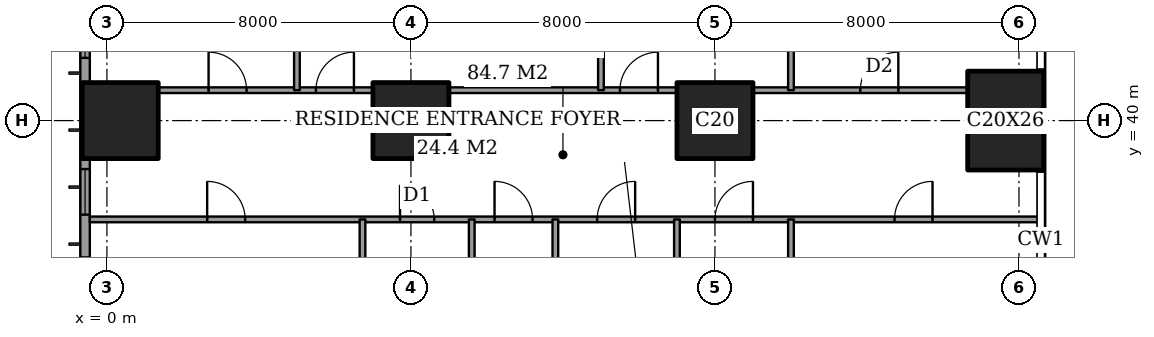
"""IFC4 building model, lengths in metres.
Left out: names, types, materials, properties, quantities, classifications, styles, units other than length and angle.
Written with IfcOpenShell. Run it as: python <this file> out.ifc"""

import sys

from ifc_helpers import new_model, si_unit, direction, frame, frame_2d, origin, origin_2d, place, context, subcontext, project, spatial, rectangle, extrude, element, fill, save


model = new_model("IFC4")
c1 = context("Model", 3, precision=1e-05, world=origin(), true_north=direction((0.0, 1.0)))
c2 = subcontext(c1, "Body", "Model", "MODEL_VIEW")
j1 = project(units=[si_unit("LENGTHUNIT", "METRE"), si_unit("PLANEANGLEUNIT", "RADIAN")], contexts=[c1])
p1 = place(None, origin())
s1 = spatial("IfcSite", under=j1, at=p1, CompositionType="ELEMENT")
p2 = place(p1, origin())
s2 = spatial("IfcBuilding", under=s1, at=p2, CompositionType="ELEMENT")
p3 = place(p2, frame((0.0, 0.0, 47.6)))
s3 = spatial("IfcBuildingStorey", under=s2, at=p3, CompositionType="ELEMENT", Elevation=47.6)
for number, where, z_axis, x_axis in (
    (1, (0.35, 40.0, 0.0), (0.0, 0.0, 1.0), (1.0, 0.0, 0.0)),
    (2, (8.0, 40.0, 0.0), (0.0, 0.0, 1.0), (1.0, 0.0, 0.0)),
    (3, (16.0, 40.0, 0.0), (0.0, 0.0, 1.0), (1.0, 0.0, 0.0)),
):
    element("IfcColumn", number, at=place(p3, frame(where, z_axis=z_axis, x_axis=x_axis)), inside=s3, PredefinedType="COLUMN", context=c2, shape_type="SweptSolid", body=[
        extrude(rectangle(XDim=2.0, YDim=2.0, at=origin_2d()), origin(), (0.0, 0.0, 1.0), 3.6),
    ])
p4 = place(p3, frame((23.65, 40.0, 0.0), z_axis=(0.0, 0.0, 1.0), x_axis=(1.0, 0.0, 0.0)))
e4 = element("IfcColumn", 4, at=p4, inside=s3, PredefinedType="COLUMN", context=c2, shape_type="SweptSolid", body=[
    extrude(rectangle(XDim=2.0, YDim=2.6, at=origin_2d()), origin(), (0.0, 0.0, 1.0), 3.6),
])
p5 = place(p3, frame((-0.575, 44.825, 0.0), z_axis=(0.0, 0.0, 1.0), x_axis=(0.0, -1.0, 0.0)))
e5 = element("IfcWall", 5, at=p5, inside=s3, PredefinedType="SOLIDWALL", context=c2, shape_type="SweptSolid", body=[
    extrude(rectangle(XDim=41.65, YDim=0.25, at=frame_2d((20.825, 0.0))), origin(), (0.0, 0.0, 1.0), 3.6),
])
p6 = place(p5, frame((0.775, 0.0, 0.6)))
e6 = element("IfcOpeningElement", 6, at=p6, cuts=e5, PredefinedType="OPENING", context=c2, shape_type="SweptSolid", body=[
    extrude(rectangle(XDim=2.4, YDim=2.0, at=frame_2d((1.2, 1.0))), frame((0.0, 0.135, 0.0), z_axis=(0.0, -1.0, 0.0), x_axis=(1.0, 0.0, 0.0)), (0.0, 0.0, 1.0), 0.27),
])
p7 = place(p5, frame((6.1, 0.0, 0.6)))
e7 = element("IfcOpeningElement", 7, at=p7, cuts=e5, PredefinedType="OPENING", context=c2, shape_type="SweptSolid", body=[
    extrude(rectangle(XDim=1.2, YDim=2.0, at=frame_2d((0.6, 1.0))), frame((0.0, 0.135, 0.0), z_axis=(0.0, -1.0, 0.0), x_axis=(1.0, 0.0, 0.0)), (0.0, 0.0, 1.0), 0.27),
])
p8 = place(p5, frame((8.425, 0.0, 0.6)))
e8 = element("IfcOpeningElement", 8, at=p8, cuts=e5, PredefinedType="OPENING", context=c2, shape_type="SweptSolid", body=[
    extrude(rectangle(XDim=2.4, YDim=2.0, at=frame_2d((1.2, 1.0))), frame((0.0, 0.135, 0.0), z_axis=(0.0, -1.0, 0.0), x_axis=(1.0, 0.0, 0.0)), (0.0, 0.0, 1.0), 0.27),
])
p9 = place(p5, frame((15.625, 0.0, 0.6)))
e9 = element("IfcOpeningElement", 9, at=p9, cuts=e5, PredefinedType="OPENING", context=c2, shape_type="SweptSolid", body=[
    extrude(rectangle(XDim=2.4, YDim=2.0, at=frame_2d((1.2, 1.0))), frame((0.0, 0.135, 0.0), z_axis=(0.0, -1.0, 0.0), x_axis=(1.0, 0.0, 0.0)), (0.0, 0.0, 1.0), 0.27),
])
p10 = place(p5, frame((23.625, 0.0, 0.6)))
e10 = element("IfcOpeningElement", 10, at=p10, cuts=e5, PredefinedType="OPENING", context=c2, shape_type="SweptSolid", body=[
    extrude(rectangle(XDim=2.4, YDim=2.0, at=frame_2d((1.2, 1.0))), frame((0.0, 0.135, 0.0), z_axis=(0.0, -1.0, 0.0), x_axis=(1.0, 0.0, 0.0)), (0.0, 0.0, 1.0), 0.27),
])
p11 = place(p5, frame((30.825, 0.0, 0.6)))
e11 = element("IfcOpeningElement", 11, at=p11, cuts=e5, PredefinedType="OPENING", context=c2, shape_type="SweptSolid", body=[
    extrude(rectangle(XDim=2.4, YDim=2.0, at=frame_2d((1.2, 1.0))), frame((0.0, 0.135, 0.0), z_axis=(0.0, -1.0, 0.0), x_axis=(1.0, 0.0, 0.0)), (0.0, 0.0, 1.0), 0.27),
])
p12 = place(p5, frame((34.5, 0.0, 0.6)))
e12 = element("IfcOpeningElement", 12, at=p12, cuts=e5, PredefinedType="OPENING", context=c2, shape_type="SweptSolid", body=[
    extrude(rectangle(XDim=1.2, YDim=2.0, at=frame_2d((0.6, 1.0))), frame((0.0, 0.135, 0.0), z_axis=(0.0, -1.0, 0.0), x_axis=(1.0, 0.0, 0.0)), (0.0, 0.0, 1.0), 0.27),
])
p13 = place(p5, frame((38.475, 0.0, 0.6)))
e13 = element("IfcOpeningElement", 13, at=p13, cuts=e5, PredefinedType="OPENING", context=c2, shape_type="SweptSolid", body=[
    extrude(rectangle(XDim=2.4, YDim=2.0, at=frame_2d((1.2, 1.0))), frame((0.0, 0.135, 0.0), z_axis=(0.0, -1.0, 0.0), x_axis=(1.0, 0.0, 0.0)), (0.0, 0.0, 1.0), 0.27),
])
p14 = place(p3, frame((-0.45, 37.4, 0.0), z_axis=(0.0, 0.0, 1.0), x_axis=(1.0, 0.0, 0.0)))
e14 = element("IfcWall", 14, at=p14, inside=s3, PredefinedType="PARTITIONING", context=c2, shape_type="SweptSolid", body=[
    extrude(rectangle(XDim=25.011, YDim=0.15, at=frame_2d((12.505, 0.0))), origin(), (0.0, 0.0, 1.0), 3.35),
])
p15 = place(p14, frame((10.65, 0.0, 0.0)))
e15 = element("IfcOpeningElement", 15, at=p15, cuts=e14, PredefinedType="OPENING", context=c2, shape_type="SweptSolid", body=[
    extrude(rectangle(XDim=1.0, YDim=2.1, at=frame_2d((0.5, 1.05))), frame((0.0, 0.085, 0.0), z_axis=(0.0, -1.0, 0.0), x_axis=(1.0, 0.0, 0.0)), (0.0, 0.0, 1.0), 0.17),
])
p16 = place(p14, frame((3.087, 0.0, 0.0)))
e16 = element("IfcOpeningElement", 16, at=p16, cuts=e14, PredefinedType="OPENING", context=c2, shape_type="SweptSolid", body=[
    extrude(rectangle(XDim=1.0, YDim=2.1, at=frame_2d((0.5, 1.05))), frame((0.0, 0.085, 0.0), z_axis=(0.0, -1.0, 0.0), x_axis=(1.0, 0.0, 0.0)), (0.0, 0.0, 1.0), 0.17),
])
p17 = place(p14, frame((8.163, 0.0, 0.0)))
e17 = element("IfcOpeningElement", 17, at=p17, cuts=e14, PredefinedType="OPENING", context=c2, shape_type="SweptSolid", body=[
    extrude(rectangle(XDim=0.9, YDim=2.1, at=frame_2d((0.45, 1.05))), frame((0.0, 0.085, 0.0), z_axis=(0.0, -1.0, 0.0), x_axis=(1.0, 0.0, 0.0)), (0.0, 0.0, 1.0), 0.17),
])
p18 = place(p14, frame((13.35, 0.0, 0.0)))
e18 = element("IfcOpeningElement", 18, at=p18, cuts=e14, PredefinedType="OPENING", context=c2, shape_type="SweptSolid", body=[
    extrude(rectangle(XDim=1.0, YDim=2.1, at=frame_2d((0.5, 1.05))), frame((0.0, 0.085, 0.0), z_axis=(0.0, -1.0, 0.0), x_axis=(1.0, 0.0, 0.0)), (0.0, 0.0, 1.0), 0.17),
])
p19 = place(p14, frame((16.45, 0.0, 0.0)))
e19 = element("IfcOpeningElement", 19, at=p19, cuts=e14, PredefinedType="OPENING", context=c2, shape_type="SweptSolid", body=[
    extrude(rectangle(XDim=1.0, YDim=2.1, at=frame_2d((0.5, 1.05))), frame((0.0, 0.085, 0.0), z_axis=(0.0, -1.0, 0.0), x_axis=(1.0, 0.0, 0.0)), (0.0, 0.0, 1.0), 0.17),
])
p20 = place(p14, frame((21.175, 0.0, 0.0)))
e20 = element("IfcOpeningElement", 20, at=p20, cuts=e14, PredefinedType="OPENING", context=c2, shape_type="SweptSolid", body=[
    extrude(rectangle(XDim=1.0, YDim=2.1, at=frame_2d((0.5, 1.05))), frame((0.0, 0.085, 0.0), z_axis=(0.0, -1.0, 0.0), x_axis=(1.0, 0.0, 0.0)), (0.0, 0.0, 1.0), 0.17),
])
p21 = place(p3, frame((1.35, 40.8, 0.0), z_axis=(0.0, 0.0, 1.0), x_axis=(1.0, 0.0, 0.0)))
e21 = element("IfcWall", 21, at=p21, inside=s3, PredefinedType="PARTITIONING", context=c2, shape_type="SweptSolid", body=[
    extrude(rectangle(XDim=5.65, YDim=0.15, at=frame_2d((2.825, 0.0))), origin(), (0.0, 0.0, 1.0), 3.35),
])
p22 = place(p21, frame((1.325, 0.0, 0.0)))
e22 = element("IfcOpeningElement", 22, at=p22, cuts=e21, PredefinedType="OPENING", context=c2, shape_type="SweptSolid", body=[
    extrude(rectangle(XDim=1.0, YDim=2.1, at=frame_2d((0.5, 1.05))), frame((0.0, 0.085, 0.0), z_axis=(0.0, -1.0, 0.0), x_axis=(1.0, 0.0, 0.0)), (0.0, 0.0, 1.0), 0.17),
])
p23 = place(p21, frame((4.15, 0.0, 0.0)))
e23 = element("IfcOpeningElement", 23, at=p23, cuts=e21, PredefinedType="OPENING", context=c2, shape_type="SweptSolid", body=[
    extrude(rectangle(XDim=1.0, YDim=2.1, at=frame_2d((0.5, 1.05))), frame((0.0, 0.085, 0.0), z_axis=(0.0, -1.0, 0.0), x_axis=(1.0, 0.0, 0.0)), (0.0, 0.0, 1.0), 0.17),
])
p24 = place(p3, frame((9.0, 40.8, 0.0), z_axis=(0.0, 0.0, 1.0), x_axis=(1.0, 0.0, 0.0)))
e24 = element("IfcWall", 24, at=p24, inside=s3, PredefinedType="PARTITIONING", context=c2, shape_type="SweptSolid", body=[
    extrude(rectangle(XDim=6.0, YDim=0.15, at=frame_2d((3.0, 0.0))), origin(), (0.0, 0.0, 1.0), 3.35),
])
p25 = place(p24, frame((4.5, 0.0, 0.0)))
e25 = element("IfcOpeningElement", 25, at=p25, cuts=e24, PredefinedType="OPENING", context=c2, shape_type="SweptSolid", body=[
    extrude(rectangle(XDim=1.0, YDim=2.1, at=frame_2d((0.5, 1.05))), frame((0.0, 0.085, 0.0), z_axis=(0.0, -1.0, 0.0), x_axis=(1.0, 0.0, 0.0)), (0.0, 0.0, 1.0), 0.17),
])
p26 = place(p3, frame((17.0, 40.8, 0.0), z_axis=(0.0, 0.0, 1.0), x_axis=(1.0, 0.0, 0.0)))
e26 = element("IfcWall", 26, at=p26, inside=s3, PredefinedType="PARTITIONING", context=c2, shape_type="SweptSolid", body=[
    extrude(rectangle(XDim=5.65, YDim=0.15, at=frame_2d((2.825, 0.0))), origin(), (0.0, 0.0, 1.0), 3.35),
])
p27 = place(p26, frame((2.825, 0.0, 0.0)))
e27 = element("IfcOpeningElement", 27, at=p27, cuts=e26, PredefinedType="OPENING", context=c2, shape_type="SweptSolid", body=[
    extrude(rectangle(XDim=1.0, YDim=2.1, at=frame_2d((0.5, 1.05))), frame((0.0, 0.085, 0.0), z_axis=(0.0, -1.0, 0.0), x_axis=(1.0, 0.0, 0.0)), (0.0, 0.0, 1.0), 0.17),
])
p28 = place(p3, frame((5.0, 40.8, 0.0), z_axis=(0.0, 0.0, 1.0), x_axis=(0.0, 1.0, 0.0)))
e28 = element("IfcWall", 28, at=p28, inside=s3, PredefinedType="PARTITIONING", context=c2, shape_type="SweptSolid", body=[
    extrude(rectangle(XDim=7.65, YDim=0.15, at=frame_2d((3.825, 0.0))), origin(), (0.0, 0.0, 1.0), 3.35),
])
p29 = place(p3, frame((6.725, 33.2, 0.0), z_axis=(0.0, 0.0, 1.0), x_axis=(0.0, 1.0, 0.0)))
e29 = element("IfcWall", 29, at=p29, inside=s3, PredefinedType="PARTITIONING", context=c2, shape_type="SweptSolid", body=[
    extrude(rectangle(XDim=4.2, YDim=0.15, at=frame_2d((2.1, 0.0))), origin(), (0.0, 0.0, 1.0), 3.35),
])
p30 = place(p3, frame((9.6, 28.0, 0.0), z_axis=(0.0, 0.0, 1.0), x_axis=(0.0, 1.0, 0.0)))
e30 = element("IfcWall", 30, at=p30, inside=s3, PredefinedType="PARTITIONING", context=c2, shape_type="SweptSolid", body=[
    extrude(rectangle(XDim=9.4, YDim=0.15, at=frame_2d((4.7, 0.0))), origin(), (0.0, 0.0, 1.0), 3.35),
])
p31 = place(p30, frame((0.5, 0.0, 0.0)))
e31 = element("IfcOpeningElement", 31, at=p31, cuts=e30, PredefinedType="OPENING", context=c2, shape_type="SweptSolid", body=[
    extrude(rectangle(XDim=1.0, YDim=2.1, at=frame_2d((0.5, 1.05))), frame((0.0, 0.085, 0.0), z_axis=(0.0, -1.0, 0.0), x_axis=(1.0, 0.0, 0.0)), (0.0, 0.0, 1.0), 0.17),
])
p32 = place(p3, frame((11.8, 30.0, 0.0), z_axis=(0.0, 0.0, 1.0), x_axis=(0.0, 1.0, 0.0)))
e32 = element("IfcWall", 32, at=p32, inside=s3, PredefinedType="PARTITIONING", context=c2, shape_type="SweptSolid", body=[
    extrude(rectangle(XDim=7.4, YDim=0.15, at=frame_2d((3.7, 0.0))), origin(), (0.0, 0.0, 1.0), 3.35),
])
p33 = place(p3, frame((13.0, 40.8, 0.0), z_axis=(0.0, 0.0, 1.0), x_axis=(0.0, 1.0, 0.0)))
e33 = element("IfcWall", 33, at=p33, inside=s3, PredefinedType="PARTITIONING", context=c2, shape_type="SweptSolid", body=[
    extrude(rectangle(XDim=7.65, YDim=0.15, at=frame_2d((3.825, 0.0))), origin(), (0.0, 0.0, 1.0), 3.35),
])
p34 = place(p3, frame((15.0, 33.2, 0.0), z_axis=(0.0, 0.0, 1.0), x_axis=(0.0, 1.0, 0.0)))
e34 = element("IfcWall", 34, at=p34, inside=s3, PredefinedType="PARTITIONING", context=c2, shape_type="SweptSolid", body=[
    extrude(rectangle(XDim=4.2, YDim=0.15, at=frame_2d((2.1, 0.0))), origin(), (0.0, 0.0, 1.0), 3.35),
])
p35 = place(p3, frame((18.0, 31.1, 0.0), z_axis=(0.0, 0.0, 1.0), x_axis=(0.0, 1.0, 0.0)))
e35 = element("IfcWall", 35, at=p35, inside=s3, PredefinedType="PARTITIONING", context=c2, shape_type="SweptSolid", body=[
    extrude(rectangle(XDim=6.3, YDim=0.15, at=frame_2d((3.15, 0.0))), origin(), (0.0, 0.0, 1.0), 3.35),
])
p36 = place(p3, frame((18.0, 40.8, 0.0), z_axis=(0.0, 0.0, 1.0), x_axis=(0.0, 1.0, 0.0)))
e36 = element("IfcWall", 36, at=p36, inside=s3, PredefinedType="PARTITIONING", context=c2, shape_type="SweptSolid", body=[
    extrude(rectangle(XDim=7.65, YDim=0.15, at=frame_2d((3.825, 0.0))), origin(), (0.0, 0.0, 1.0), 3.35),
])
p37 = place(p6, origin())
e37 = element("IfcWindow", 37, at=p37, inside=s3, PartitioningType="SINGLE_PANEL", PredefinedType="WINDOW", context=c2, shape_type="SweptSolid", body=[
    extrude(rectangle(XDim=2.4, YDim=2.0, at=frame_2d((1.2, 1.0))), frame((0.0, 0.03, 0.0), z_axis=(0.0, -1.0, 0.0), x_axis=(1.0, 0.0, 0.0)), (0.0, 0.0, 1.0), 0.06),
])
fill(e6, e37)
p38 = place(p7, origin())
e38 = element("IfcWindow", 38, at=p38, inside=s3, PartitioningType="SINGLE_PANEL", PredefinedType="WINDOW", context=c2, shape_type="SweptSolid", body=[
    extrude(rectangle(XDim=1.2, YDim=2.0, at=frame_2d((0.6, 1.0))), frame((0.0, 0.03, 0.0), z_axis=(0.0, -1.0, 0.0), x_axis=(1.0, 0.0, 0.0)), (0.0, 0.0, 1.0), 0.06),
])
fill(e7, e38)
p39 = place(p22, origin())
e39 = element("IfcDoor", 39, at=p39, inside=s3, OperationType="SINGLE_SWING_RIGHT", PredefinedType="DOOR", context=c2, shape_type="SweptSolid", body=[
    extrude(rectangle(XDim=1.0, YDim=2.1, at=frame_2d((0.5, 1.05))), frame((0.0, 0.025, 0.0), z_axis=(0.0, -1.0, 0.0), x_axis=(1.0, 0.0, 0.0)), (0.0, 0.0, 1.0), 0.05),
])
fill(e22, e39)
p40 = place(p23, origin())
e40 = element("IfcDoor", 40, at=p40, inside=s3, OperationType="SINGLE_SWING_LEFT", PredefinedType="DOOR", context=c2, shape_type="SweptSolid", body=[
    extrude(rectangle(XDim=1.0, YDim=2.1, at=frame_2d((0.5, 1.05))), frame((0.0, 0.025, 0.0), z_axis=(0.0, -1.0, 0.0), x_axis=(1.0, 0.0, 0.0)), (0.0, 0.0, 1.0), 0.05),
])
fill(e23, e40)
p41 = place(p25, origin())
e41 = element("IfcDoor", 41, at=p41, inside=s3, OperationType="SINGLE_SWING_LEFT", PredefinedType="DOOR", context=c2, shape_type="SweptSolid", body=[
    extrude(rectangle(XDim=1.0, YDim=2.1, at=frame_2d((0.5, 1.05))), frame((0.0, 0.025, 0.0), z_axis=(0.0, -1.0, 0.0), x_axis=(1.0, 0.0, 0.0)), (0.0, 0.0, 1.0), 0.05),
])
fill(e25, e41)
p42 = place(p27, origin())
e42 = element("IfcDoor", 42, at=p42, inside=s3, OperationType="SINGLE_SWING_LEFT", PredefinedType="DOOR", context=c2, shape_type="SweptSolid", body=[
    extrude(rectangle(XDim=1.0, YDim=2.1, at=frame_2d((0.5, 1.05))), frame((0.0, 0.025, 0.0), z_axis=(0.0, -1.0, 0.0), x_axis=(1.0, 0.0, 0.0)), (0.0, 0.0, 1.0), 0.05),
])
fill(e27, e42)
p43 = place(p15, origin())
e43 = element("IfcDoor", 43, at=p43, inside=s3, OperationType="SINGLE_SWING_RIGHT", PredefinedType="DOOR", context=c2, shape_type="SweptSolid", body=[
    extrude(rectangle(XDim=1.0, YDim=2.1, at=frame_2d((0.5, 1.05))), frame((0.0, 0.025, 0.0), z_axis=(0.0, -1.0, 0.0), x_axis=(1.0, 0.0, 0.0)), (0.0, 0.0, 1.0), 0.05),
])
fill(e15, e43)
p44 = place(p16, origin())
e44 = element("IfcDoor", 44, at=p44, inside=s3, OperationType="SINGLE_SWING_RIGHT", PredefinedType="DOOR", context=c2, shape_type="SweptSolid", body=[
    extrude(rectangle(XDim=1.0, YDim=2.1, at=frame_2d((0.5, 1.05))), frame((0.0, 0.025, 0.0), z_axis=(0.0, -1.0, 0.0), x_axis=(1.0, 0.0, 0.0)), (0.0, 0.0, 1.0), 0.05),
])
fill(e16, e44)
p45 = place(p17, origin())
e45 = element("IfcDoor", 45, at=p45, inside=s3, OperationType="SINGLE_SWING_RIGHT", PredefinedType="DOOR", context=c2, shape_type="SweptSolid", body=[
    extrude(rectangle(XDim=0.9, YDim=2.1, at=frame_2d((0.45, 1.05))), frame((0.0, 0.025, 0.0), z_axis=(0.0, -1.0, 0.0), x_axis=(1.0, 0.0, 0.0)), (0.0, 0.0, 1.0), 0.05),
])
fill(e17, e45)
p46 = place(p18, origin())
e46 = element("IfcDoor", 46, at=p46, inside=s3, OperationType="SINGLE_SWING_LEFT", PredefinedType="DOOR", context=c2, shape_type="SweptSolid", body=[
    extrude(rectangle(XDim=1.0, YDim=2.1, at=frame_2d((0.5, 1.05))), frame((0.0, 0.025, 0.0), z_axis=(0.0, -1.0, 0.0), x_axis=(1.0, 0.0, 0.0)), (0.0, 0.0, 1.0), 0.05),
])
fill(e18, e46)
p47 = place(p19, origin())
e47 = element("IfcDoor", 47, at=p47, inside=s3, OperationType="SINGLE_SWING_LEFT", PredefinedType="DOOR", context=c2, shape_type="SweptSolid", body=[
    extrude(rectangle(XDim=1.0, YDim=2.1, at=frame_2d((0.5, 1.05))), frame((0.0, 0.025, 0.0), z_axis=(0.0, -1.0, 0.0), x_axis=(1.0, 0.0, 0.0)), (0.0, 0.0, 1.0), 0.05),
])
fill(e19, e47)
p48 = place(p20, origin())
e48 = element("IfcDoor", 48, at=p48, inside=s3, OperationType="SINGLE_SWING_LEFT", PredefinedType="DOOR", context=c2, shape_type="SweptSolid", body=[
    extrude(rectangle(XDim=1.0, YDim=2.1, at=frame_2d((0.5, 1.05))), frame((0.0, 0.025, 0.0), z_axis=(0.0, -1.0, 0.0), x_axis=(1.0, 0.0, 0.0)), (0.0, 0.0, 1.0), 0.05),
])
fill(e20, e48)
save(model, sys.argv[1])
